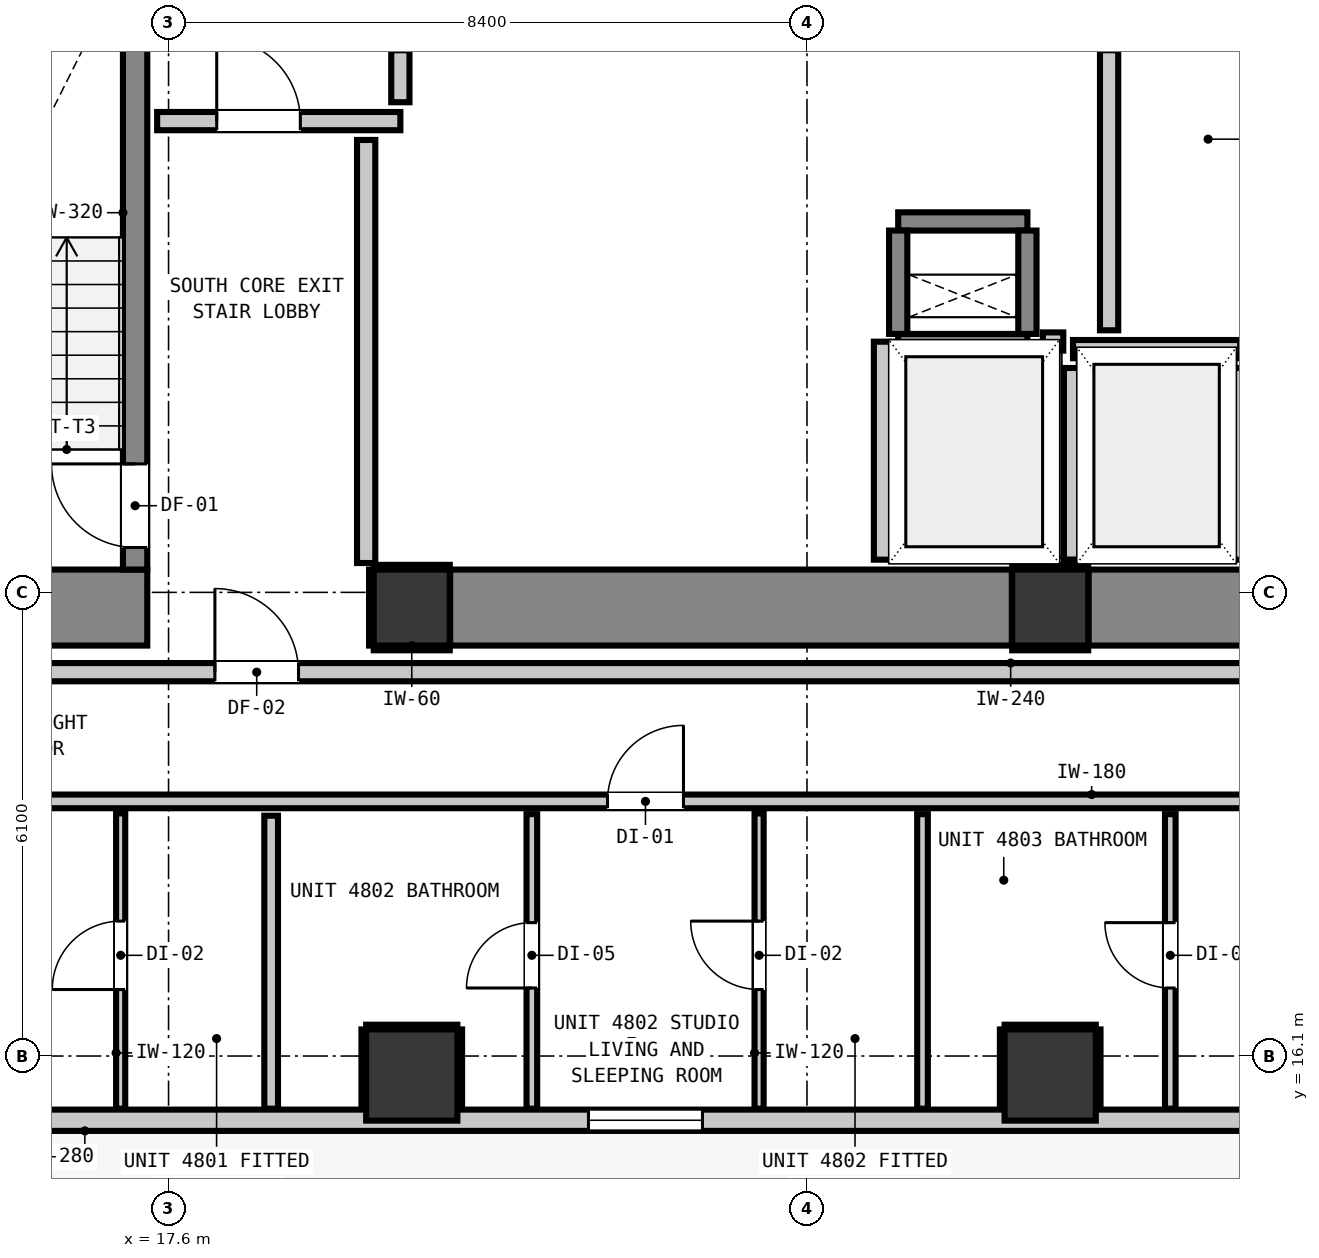
"""IFC4 building model, lengths in metres.
Left out: names, types, materials, properties, quantities, classifications, styles, units other than length and angle.
Written with IfcOpenShell. Run it as: python <this file> out.ifc"""

import sys

from ifc_helpers import new_model, si_unit, direction, frame, frame_2d, origin, origin_2d, place, context, subcontext, project, spatial, rectangle, extrude, element, fill, save


model = new_model("IFC4")
c1 = context("Model", 3, precision=1e-05, world=origin(), true_north=direction((0.0, 1.0)))
c2 = subcontext(c1, "Body", "Model", "MODEL_VIEW")
j1 = project(units=[si_unit("LENGTHUNIT", "METRE"), si_unit("PLANEANGLEUNIT", "RADIAN")], contexts=[c1])
p1 = place(None, origin())
s1 = spatial("IfcSite", under=j1, at=p1, CompositionType="ELEMENT")
p2 = place(p1, origin())
s2 = spatial("IfcBuilding", under=s1, at=p2, CompositionType="ELEMENT")
p3 = place(p2, frame((0.0, 0.0, 165.84)))
s3 = spatial("IfcBuildingStorey", under=s2, at=p3, CompositionType="ELEMENT", Elevation=165.84)
for number, where, z_axis, x_axis in (
    (1, (20.8, 22.0, 0.0), (0.0, 0.0, 1.0), (1.0, 0.0, 0.0)),
    (2, (29.2, 22.0, 0.0), (0.0, 0.0, 1.0), (1.0, 0.0, 0.0)),
):
    element("IfcColumn", number, at=place(p3, frame(where, z_axis=z_axis, x_axis=x_axis)), inside=s3, PredefinedType="COLUMN", context=c2, shape_type="SweptSolid", body=[
        extrude(rectangle(XDim=1.0, YDim=1.0, at=origin_2d()), origin(), (0.0, 0.0, 1.0), 3.32),
    ])
p4 = place(p3, frame((13.24, 22.0, 0.0), z_axis=(0.0, 0.0, 1.0), x_axis=(1.0, 0.0, 0.0)))
e3 = element("IfcWall", 3, at=p4, inside=s3, PredefinedType="SHEAR", context=c2, shape_type="SweptSolid", body=[
    extrude(rectangle(XDim=4.08, YDim=1.0, at=frame_2d((2.04, 0.0))), origin(), (0.0, 0.0, 1.0), 3.32),
])
p5 = place(p3, frame((29.705, 22.0, 0.0), z_axis=(0.0, 0.0, 1.0), x_axis=(1.0, 0.0, 0.0)))
e4 = element("IfcWall", 4, at=p5, inside=s3, PredefinedType="SHEAR", context=c2, shape_type="SweptSolid", body=[
    extrude(rectangle(XDim=6.955, YDim=1.0, at=frame_2d((3.478, 0.0))), origin(), (0.0, 0.0, 1.0), 3.32),
])
p6 = place(p3, frame((21.305, 22.0, 0.0), z_axis=(0.0, 0.0, 1.0), x_axis=(1.0, 0.0, 0.0)))
e5 = element("IfcWall", 5, at=p6, inside=s3, PredefinedType="SHEAR", context=c2, shape_type="SweptSolid", body=[
    extrude(rectangle(XDim=7.39, YDim=1.0, at=frame_2d((3.695, 0.0))), origin(), (0.0, 0.0, 1.0), 3.32),
])
p7 = place(p3, frame((17.16, 22.5, 0.0), z_axis=(0.0, 0.0, 1.0), x_axis=(0.0, 1.0, 0.0)))
e6 = element("IfcWall", 6, at=p7, inside=s3, PredefinedType="SHEAR", context=c2, shape_type="SweptSolid", body=[
    extrude(rectangle(XDim=7.9, YDim=0.32, at=frame_2d((3.95, 0.0))), origin(), (0.0, 0.0, 1.0), 3.32),
])
p8 = place(p7, frame((0.29, 0.0, 0.0)))
e7 = element("IfcOpeningElement", 7, at=p8, cuts=e6, PredefinedType="OPENING", context=c2, shape_type="SweptSolid", body=[
    extrude(rectangle(XDim=1.1, YDim=2.15, at=frame_2d((0.55, 1.075))), frame((0.0, 0.17, 0.0), z_axis=(0.0, -1.0, 0.0), x_axis=(1.0, 0.0, 0.0)), (0.0, 0.0, 1.0), 0.34),
])
for number, where, z_axis, x_axis in (
    (8, (27.2, 25.48, 0.0), (0.0, 0.0, 1.0), (1.0, 0.0, 0.0)),
    (9, (27.2, 27.08, 0.0), (0.0, 0.0, 1.0), (1.0, 0.0, 0.0)),
):
    element("IfcWall", number, at=place(p3, frame(where, z_axis=z_axis, x_axis=x_axis)), inside=s3, PredefinedType="SHEAR", context=c2, shape_type="SweptSolid", body=[
        extrude(rectangle(XDim=1.7, YDim=0.24, at=frame_2d((0.85, 0.0))), origin(), (0.0, 0.0, 1.0), 3.32),
    ])
for number, where, z_axis, x_axis in (
    (10, (27.2, 25.6, 0.0), (0.0, 0.0, 1.0), (0.0, 1.0, 0.0)),
    (11, (28.9, 25.6, 0.0), (0.0, 0.0, 1.0), (0.0, 1.0, 0.0)),
):
    element("IfcWall", number, at=place(p3, frame(where, z_axis=z_axis, x_axis=x_axis)), inside=s3, PredefinedType="SHEAR", context=c2, shape_type="SweptSolid", body=[
        extrude(rectangle(XDim=1.36, YDim=0.24, at=frame_2d((0.68, 0.0))), origin(), (0.0, 0.0, 1.0), 3.32),
    ])
for number, where, z_axis, x_axis in (
    (12, (20.8, 15.85, -0.2), (0.0, 0.0, 1.0), (1.0, 0.0, 0.0)),
    (13, (29.2, 15.85, -0.2), (0.0, 0.0, 1.0), (1.0, 0.0, 0.0)),
):
    element("IfcColumn", number, at=place(p3, frame(where, z_axis=z_axis, x_axis=x_axis)), inside=s3, PredefinedType="COLUMN", context=c2, shape_type="SweptSolid", body=[
        extrude(rectangle(XDim=1.2, YDim=1.2, at=origin_2d()), origin(), (0.0, 0.0, 1.0), 3.52),
    ])
p9 = place(p3, frame((40.445, 15.255, 0.0), z_axis=(0.0, 0.0, 1.0), x_axis=(-1.0, 0.0, 0.0)))
e14 = element("IfcWall", 14, at=p9, inside=s3, PredefinedType="STANDARD", context=c2, shape_type="SweptSolid", body=[
    extrude(rectangle(XDim=35.09, YDim=0.28, at=frame_2d((17.545, 0.0))), origin(), (0.0, 0.0, 1.0), 3.08),
])
p10 = place(p9, frame((0.904, 0.0, 0.0)))
e15 = element("IfcOpeningElement", 15, at=p10, cuts=e14, PredefinedType="OPENING", context=c2, shape_type="SweptSolid", body=[
    extrude(rectangle(XDim=1.0, YDim=2.15, at=frame_2d((0.5, 1.075))), frame((0.0, 0.15, 0.0), z_axis=(0.0, -1.0, 0.0), x_axis=(1.0, 0.0, 0.0)), (0.0, 0.0, 1.0), 0.3),
])
p11 = place(p9, frame((30.573, 0.0, 0.85)))
e16 = element("IfcOpeningElement", 16, at=p11, cuts=e14, PredefinedType="OPENING", context=c2, shape_type="SweptSolid", body=[
    extrude(rectangle(XDim=1.5, YDim=1.8, at=frame_2d((0.75, 0.9))), frame((0.0, 0.15, 0.0), z_axis=(0.0, -1.0, 0.0), x_axis=(1.0, 0.0, 0.0)), (0.0, 0.0, 1.0), 0.3),
])
p12 = place(p9, frame((15.82, 0.0, 0.85)))
e17 = element("IfcOpeningElement", 17, at=p12, cuts=e14, PredefinedType="OPENING", context=c2, shape_type="SweptSolid", body=[
    extrude(rectangle(XDim=1.5, YDim=1.8, at=frame_2d((0.75, 0.9))), frame((0.0, 0.15, 0.0), z_axis=(0.0, -1.0, 0.0), x_axis=(1.0, 0.0, 0.0)), (0.0, 0.0, 1.0), 0.3),
])
p13 = place(p9, frame((6.305, 0.0, 0.85)))
e18 = element("IfcOpeningElement", 18, at=p13, cuts=e14, PredefinedType="OPENING", context=c2, shape_type="SweptSolid", body=[
    extrude(rectangle(XDim=1.5, YDim=1.8, at=frame_2d((0.75, 0.9))), frame((0.0, 0.15, 0.0), z_axis=(0.0, -1.0, 0.0), x_axis=(1.0, 0.0, 0.0)), (0.0, 0.0, 1.0), 0.3),
])
p14 = place(p3, frame((29.5, 25.4, 0.0), z_axis=(0.0, 0.0, 1.0), x_axis=(1.0, 0.0, 0.0)))
e19 = element("IfcWall", 19, at=p14, inside=s3, PredefinedType="PARTITIONING", context=c2, shape_type="SweptSolid", body=[
    extrude(rectangle(XDim=2.2, YDim=0.24, at=frame_2d((1.1, 0.0))), origin(), (0.0, 0.0, 1.0), 3.08),
])
p15 = place(p3, frame((29.5, 22.632, 0.0), z_axis=(0.0, 0.0, 1.0), x_axis=(0.0, 1.0, 0.0)))
e20 = element("IfcWall", 20, at=p15, inside=s3, PredefinedType="PARTITIONING", context=c2, shape_type="SweptSolid", body=[
    extrude(rectangle(XDim=2.52, YDim=0.24, at=frame_2d((1.26, 0.0))), origin(), (0.0, 0.0, 1.0), 2.315),
])
p16 = place(p3, frame((31.7, 22.63, 0.0), z_axis=(0.0, 0.0, 1.0), x_axis=(0.0, 1.0, 0.0)))
e21 = element("IfcWall", 21, at=p16, inside=s3, PredefinedType="PARTITIONING", context=c2, shape_type="SweptSolid", body=[
    extrude(rectangle(XDim=2.522, YDim=0.24, at=frame_2d((1.261, 0.0))), origin(), (0.0, 0.0, 1.0), 3.08),
])
p17 = place(p3, frame((29.103, 25.5, 0.0), z_axis=(0.0, 0.0, 1.0), x_axis=(1.0, 0.0, 0.0)))
e22 = element("IfcWall", 22, at=p17, inside=s3, PredefinedType="PARTITIONING", context=c2, shape_type="SweptSolid", body=[
    extrude(rectangle(XDim=0.269, YDim=0.24, at=frame_2d((0.135, 0.0))), origin(), (0.0, 0.0, 1.0), 3.08),
])
p18 = place(p3, frame((27.0, 22.63, 0.0), z_axis=(0.0, 0.0, 1.0), x_axis=(0.0, 1.0, 0.0)))
e23 = element("IfcWall", 23, at=p18, inside=s3, PredefinedType="PARTITIONING", context=c2, shape_type="SweptSolid", body=[
    extrude(rectangle(XDim=2.868, YDim=0.24, at=frame_2d((1.434, 0.0))), origin(), (0.0, 0.0, 1.0), 3.08),
])
p19 = place(p3, frame((12.983, 21.15, 0.0), z_axis=(0.0, 0.0, 1.0), x_axis=(1.0, 0.0, 0.0)))
e24 = element("IfcWall", 24, at=p19, inside=s3, PredefinedType="PARTITIONING", context=c2, shape_type="SweptSolid", body=[
    extrude(rectangle(XDim=29.61, YDim=0.24, at=frame_2d((14.805, 0.0))), origin(), (0.0, 0.0, 1.0), 3.08),
])
p20 = place(p19, frame((5.227, 0.0, 0.0)))
e25 = element("IfcOpeningElement", 25, at=p20, cuts=e24, PredefinedType="OPENING", context=c2, shape_type="SweptSolid", body=[
    extrude(rectangle(XDim=1.1, YDim=2.15, at=frame_2d((0.55, 1.075))), frame((0.0, 0.13, 0.0), z_axis=(0.0, -1.0, 0.0), x_axis=(1.0, 0.0, 0.0)), (0.0, 0.0, 1.0), 0.26),
])
p21 = place(p19, frame((25.067, 0.0, 0.0)))
e26 = element("IfcOpeningElement", 26, at=p21, cuts=e24, PredefinedType="OPENING", context=c2, shape_type="SweptSolid", body=[
    extrude(rectangle(XDim=1.4, YDim=2.15, at=frame_2d((0.7, 1.075))), frame((0.0, 0.13, 0.0), z_axis=(0.0, -1.0, 0.0), x_axis=(1.0, 0.0, 0.0)), (0.0, 0.0, 1.0), 0.26),
])
p22 = place(p3, frame((17.45, 28.4, 0.0), z_axis=(0.0, 0.0, 1.0), x_axis=(1.0, 0.0, 0.0)))
e27 = element("IfcWall", 27, at=p22, inside=s3, PredefinedType="PARTITIONING", context=c2, shape_type="SweptSolid", body=[
    extrude(rectangle(XDim=3.2, YDim=0.24, at=frame_2d((1.6, 0.0))), origin(), (0.0, 0.0, 1.0), 3.08),
])
p23 = place(p22, frame((0.784, 0.0, 0.0)))
e28 = element("IfcOpeningElement", 28, at=p23, cuts=e27, PredefinedType="OPENING", context=c2, shape_type="SweptSolid", body=[
    extrude(rectangle(XDim=1.1, YDim=2.15, at=frame_2d((0.55, 1.075))), frame((0.0, 0.13, 0.0), z_axis=(0.0, -1.0, 0.0), x_axis=(1.0, 0.0, 0.0)), (0.0, 0.0, 1.0), 0.26),
])
p24 = place(p3, frame((12.983, 19.45, 0.0), z_axis=(0.0, 0.0, 1.0), x_axis=(1.0, 0.0, 0.0)))
e29 = element("IfcWall", 29, at=p24, inside=s3, PredefinedType="PARTITIONING", context=c2, shape_type="SweptSolid", body=[
    extrude(rectangle(XDim=29.61, YDim=0.18, at=frame_2d((14.805, 0.0))), origin(), (0.0, 0.0, 1.0), 3.08),
])
p25 = place(p24, frame((10.392, 0.0, 0.0)))
e30 = element("IfcOpeningElement", 30, at=p25, cuts=e29, PredefinedType="OPENING", context=c2, shape_type="SweptSolid", body=[
    extrude(rectangle(XDim=1.0, YDim=2.15, at=frame_2d((0.5, 1.075))), frame((0.0, 0.1, 0.0), z_axis=(0.0, -1.0, 0.0), x_axis=(1.0, 0.0, 0.0)), (0.0, 0.0, 1.0), 0.2),
])
p26 = place(p24, frame((22.132, 0.0, 0.0)))
e31 = element("IfcOpeningElement", 31, at=p26, cuts=e29, PredefinedType="OPENING", context=c2, shape_type="SweptSolid", body=[
    extrude(rectangle(XDim=1.0, YDim=2.15, at=frame_2d((0.5, 1.075))), frame((0.0, 0.1, 0.0), z_axis=(0.0, -1.0, 0.0), x_axis=(1.0, 0.0, 0.0)), (0.0, 0.0, 1.0), 0.2),
])
p27 = place(p3, frame((20.2, 22.586, 0.0), z_axis=(0.0, 0.0, 1.0), x_axis=(0.0, 1.0, 0.0)))
e32 = element("IfcWall", 32, at=p27, inside=s3, PredefinedType="PARTITIONING", context=c2, shape_type="SweptSolid", body=[
    extrude(rectangle(XDim=5.566, YDim=0.24, at=frame_2d((2.783, 0.0))), origin(), (0.0, 0.0, 1.0), 3.08),
])
p28 = place(p3, frame((20.65, 28.648, 0.0), z_axis=(0.0, 0.0, 1.0), x_axis=(0.0, 1.0, 0.0)))
e33 = element("IfcWall", 33, at=p28, inside=s3, PredefinedType="PARTITIONING", context=c2, shape_type="SweptSolid", body=[
    extrude(rectangle(XDim=0.684, YDim=0.24, at=frame_2d((0.342, 0.0))), origin(), (0.0, 0.0, 1.0), 2.315),
])
p29 = place(p3, frame((29.975, 25.648, 0.0), z_axis=(0.0, 0.0, 1.0), x_axis=(0.0, 1.0, 0.0)))
e34 = element("IfcWall", 34, at=p29, inside=s3, PredefinedType="PARTITIONING", context=c2, shape_type="SweptSolid", body=[
    extrude(rectangle(XDim=3.684, YDim=0.24, at=frame_2d((1.842, 0.0))), origin(), (0.0, 0.0, 1.0), 3.08),
])
p30 = place(p3, frame((18.95, 15.407, 0.0), z_axis=(0.0, 0.0, 1.0), x_axis=(0.0, 1.0, 0.0)))
e35 = element("IfcWall", 35, at=p30, inside=s3, PredefinedType="PARTITIONING", context=c2, shape_type="SweptSolid", body=[
    extrude(rectangle(XDim=3.855, YDim=0.18, at=frame_2d((1.927, 0.0))), origin(), (0.0, 0.0, 1.0), 3.08),
])
p31 = place(p3, frame((22.38, 15.407, 0.0), z_axis=(0.0, 0.0, 1.0), x_axis=(0.0, 1.0, 0.0)))
e36 = element("IfcWall", 36, at=p31, inside=s3, PredefinedType="PARTITIONING", context=c2, shape_type="SweptSolid", body=[
    extrude(rectangle(XDim=3.875, YDim=0.14, at=frame_2d((1.938, 0.0))), origin(), (0.0, 0.0, 1.0), 3.08),
])
p32 = place(p31, frame((1.588, 0.0, 0.0)))
e37 = element("IfcOpeningElement", 37, at=p32, cuts=e36, PredefinedType="OPENING", context=c2, shape_type="SweptSolid", body=[
    extrude(rectangle(XDim=0.86, YDim=2.02, at=frame_2d((0.43, 1.01))), frame((0.0, 0.08, 0.0), z_axis=(0.0, -1.0, 0.0), x_axis=(1.0, 0.0, 0.0)), (0.0, 0.0, 1.0), 0.16),
])
p33 = place(p3, frame((27.52, 15.407, 0.0), z_axis=(0.0, 0.0, 1.0), x_axis=(0.0, 1.0, 0.0)))
e38 = element("IfcWall", 38, at=p33, inside=s3, PredefinedType="PARTITIONING", context=c2, shape_type="SweptSolid", body=[
    extrude(rectangle(XDim=3.875, YDim=0.14, at=frame_2d((1.938, 0.0))), origin(), (0.0, 0.0, 1.0), 3.08),
])
p34 = place(p3, frame((30.78, 15.407, 0.0), z_axis=(0.0, 0.0, 1.0), x_axis=(0.0, 1.0, 0.0)))
e39 = element("IfcWall", 39, at=p34, inside=s3, PredefinedType="PARTITIONING", context=c2, shape_type="SweptSolid", body=[
    extrude(rectangle(XDim=3.875, YDim=0.14, at=frame_2d((1.938, 0.0))), origin(), (0.0, 0.0, 1.0), 3.08),
])
p35 = place(p34, frame((1.588, 0.0, 0.0)))
e40 = element("IfcOpeningElement", 40, at=p35, cuts=e39, PredefinedType="OPENING", context=c2, shape_type="SweptSolid", body=[
    extrude(rectangle(XDim=0.86, YDim=2.02, at=frame_2d((0.43, 1.01))), frame((0.0, 0.08, 0.0), z_axis=(0.0, -1.0, 0.0), x_axis=(1.0, 0.0, 0.0)), (0.0, 0.0, 1.0), 0.16),
])
p36 = place(p3, frame((16.97, 15.407, 0.0), z_axis=(0.0, 0.0, 1.0), x_axis=(0.0, 1.0, 0.0)))
e41 = element("IfcWall", 41, at=p36, inside=s3, PredefinedType="PARTITIONING", context=c2, shape_type="SweptSolid", body=[
    extrude(rectangle(XDim=3.885, YDim=0.12, at=frame_2d((1.942, 0.0))), origin(), (0.0, 0.0, 1.0), 3.08),
])
p37 = place(p36, frame((1.568, 0.0, 0.0)))
e42 = element("IfcOpeningElement", 42, at=p37, cuts=e41, PredefinedType="OPENING", context=c2, shape_type="SweptSolid", body=[
    extrude(rectangle(XDim=0.9, YDim=2.1, at=frame_2d((0.45, 1.05))), frame((0.0, 0.07, 0.0), z_axis=(0.0, -1.0, 0.0), x_axis=(1.0, 0.0, 0.0)), (0.0, 0.0, 1.0), 0.14),
])
p38 = place(p3, frame((25.37, 15.407, 0.0), z_axis=(0.0, 0.0, 1.0), x_axis=(0.0, 1.0, 0.0)))
e43 = element("IfcWall", 43, at=p38, inside=s3, PredefinedType="PARTITIONING", context=c2, shape_type="SweptSolid", body=[
    extrude(rectangle(XDim=3.885, YDim=0.12, at=frame_2d((1.942, 0.0))), origin(), (0.0, 0.0, 1.0), 3.08),
])
p39 = place(p38, frame((1.568, 0.0, 0.0)))
e44 = element("IfcOpeningElement", 44, at=p39, cuts=e43, PredefinedType="OPENING", context=c2, shape_type="SweptSolid", body=[
    extrude(rectangle(XDim=0.9, YDim=2.1, at=frame_2d((0.45, 1.05))), frame((0.0, 0.07, 0.0), z_axis=(0.0, -1.0, 0.0), x_axis=(1.0, 0.0, 0.0)), (0.0, 0.0, 1.0), 0.14),
])
for number, where, z_axis, x_axis in (
    (45, (20.3, 21.468, 0.0), (0.0, 0.0, 1.0), (1.0, 0.0, 0.0)),
    (46, (20.3, 22.532, 0.0), (0.0, 0.0, 1.0), (1.0, 0.0, 0.0)),
    (47, (20.268, 21.5, 0.0), (0.0, 0.0, 1.0), (0.0, 1.0, 0.0)),
    (48, (28.7, 21.468, 0.0), (0.0, 0.0, 1.0), (1.0, 0.0, 0.0)),
    (49, (28.7, 22.532, 0.0), (0.0, 0.0, 1.0), (1.0, 0.0, 0.0)),
):
    element("IfcWall", number, at=place(p3, frame(where, z_axis=z_axis, x_axis=x_axis)), inside=s3, PredefinedType="PARTITIONING", context=c2, shape_type="SweptSolid", body=[
        extrude(rectangle(XDim=1.0, YDim=0.06, at=frame_2d((0.5, 0.0))), origin(), (0.0, 0.0, 1.0), 1.45),
    ])
p40 = place(p3, frame((20.2, 16.482, 0.0), z_axis=(0.0, 0.0, 1.0), x_axis=(1.0, 0.0, 0.0)))
e50 = element("IfcWall", 50, at=p40, inside=s3, PredefinedType="PARTITIONING", context=c2, shape_type="SweptSolid", body=[
    extrude(rectangle(XDim=1.2, YDim=0.06, at=frame_2d((0.6, 0.0))), origin(), (0.0, 0.0, 1.0), 1.45),
])
for number, where, z_axis, x_axis in (
    (51, (20.168, 15.41, 0.0), (0.0, 0.0, 1.0), (0.0, 1.0, 0.0)),
    (52, (21.432, 15.41, 0.0), (0.0, 0.0, 1.0), (0.0, 1.0, 0.0)),
):
    element("IfcWall", number, at=place(p3, frame(where, z_axis=z_axis, x_axis=x_axis)), inside=s3, PredefinedType="PARTITIONING", context=c2, shape_type="SweptSolid", body=[
        extrude(rectangle(XDim=1.04, YDim=0.06, at=frame_2d((0.52, 0.0))), origin(), (0.0, 0.0, 1.0), 1.45),
    ])
p41 = place(p3, frame((28.6, 16.482, 0.0), z_axis=(0.0, 0.0, 1.0), x_axis=(1.0, 0.0, 0.0)))
e53 = element("IfcWall", 53, at=p41, inside=s3, PredefinedType="PARTITIONING", context=c2, shape_type="SweptSolid", body=[
    extrude(rectangle(XDim=1.2, YDim=0.06, at=frame_2d((0.6, 0.0))), origin(), (0.0, 0.0, 1.0), 1.45),
])
for number, where, z_axis, x_axis in (
    (54, (28.568, 15.41, 0.0), (0.0, 0.0, 1.0), (0.0, 1.0, 0.0)),
    (55, (29.832, 15.41, 0.0), (0.0, 0.0, 1.0), (0.0, 1.0, 0.0)),
):
    element("IfcWall", number, at=place(p3, frame(where, z_axis=z_axis, x_axis=x_axis)), inside=s3, PredefinedType="PARTITIONING", context=c2, shape_type="SweptSolid", body=[
        extrude(rectangle(XDim=1.04, YDim=0.06, at=frame_2d((0.52, 0.0))), origin(), (0.0, 0.0, 1.0), 1.45),
    ])
p42 = place(p12, origin())
e56 = element("IfcWindow", 56, at=p42, inside=s3, PartitioningType="SINGLE_PANEL", PredefinedType="WINDOW", context=c2, shape_type="SweptSolid", body=[
    extrude(rectangle(XDim=1.5, YDim=1.8, at=frame_2d((0.75, 0.9))), frame((0.0, 0.03, 0.0), z_axis=(0.0, -1.0, 0.0), x_axis=(1.0, 0.0, 0.0)), (0.0, 0.0, 1.0), 0.06),
])
fill(e17, e56)
p43 = place(p8, origin())
e57 = element("IfcDoor", 57, at=p43, inside=s3, OperationType="SINGLE_SWING_RIGHT", PredefinedType="DOOR", context=c2, shape_type="SweptSolid", body=[
    extrude(rectangle(XDim=1.1, YDim=2.15, at=frame_2d((0.55, 1.075))), frame((0.0, 0.025, 0.0), z_axis=(0.0, -1.0, 0.0), x_axis=(1.0, 0.0, 0.0)), (0.0, 0.0, 1.0), 0.05),
])
fill(e7, e57)
p44 = place(p23, origin())
e58 = element("IfcDoor", 58, at=p44, inside=s3, OperationType="SINGLE_SWING_LEFT", PredefinedType="DOOR", context=c2, shape_type="SweptSolid", body=[
    extrude(rectangle(XDim=1.1, YDim=2.15, at=frame_2d((0.55, 1.075))), frame((0.0, 0.025, 0.0), z_axis=(0.0, -1.0, 0.0), x_axis=(1.0, 0.0, 0.0)), (0.0, 0.0, 1.0), 0.05),
])
fill(e28, e58)
p45 = place(p20, origin())
e59 = element("IfcDoor", 59, at=p45, inside=s3, OperationType="SINGLE_SWING_LEFT", PredefinedType="DOOR", context=c2, shape_type="SweptSolid", body=[
    extrude(rectangle(XDim=1.1, YDim=2.15, at=frame_2d((0.55, 1.075))), frame((0.0, 0.025, 0.0), z_axis=(0.0, -1.0, 0.0), x_axis=(1.0, 0.0, 0.0)), (0.0, 0.0, 1.0), 0.05),
])
fill(e25, e59)
p46 = place(p37, origin())
e60 = element("IfcDoor", 60, at=p46, inside=s3, OperationType="SINGLE_SWING_LEFT", PredefinedType="DOOR", context=c2, shape_type="SweptSolid", body=[
    extrude(rectangle(XDim=0.9, YDim=2.1, at=frame_2d((0.45, 1.05))), frame((0.0, 0.025, 0.0), z_axis=(0.0, -1.0, 0.0), x_axis=(1.0, 0.0, 0.0)), (0.0, 0.0, 1.0), 0.05),
])
fill(e42, e60)
p47 = place(p25, origin())
e61 = element("IfcDoor", 61, at=p47, inside=s3, OperationType="SINGLE_SWING_RIGHT", PredefinedType="DOOR", context=c2, shape_type="SweptSolid", body=[
    extrude(rectangle(XDim=1.0, YDim=2.15, at=frame_2d((0.5, 1.075))), frame((0.0, 0.025, 0.0), z_axis=(0.0, -1.0, 0.0), x_axis=(1.0, 0.0, 0.0)), (0.0, 0.0, 1.0), 0.05),
])
fill(e30, e61)
p48 = place(p32, origin())
e62 = element("IfcDoor", 62, at=p48, inside=s3, OperationType="SINGLE_SWING_LEFT", PredefinedType="DOOR", context=c2, shape_type="SweptSolid", body=[
    extrude(rectangle(XDim=0.86, YDim=2.02, at=frame_2d((0.43, 1.01))), frame((0.0, 0.025, 0.0), z_axis=(0.0, -1.0, 0.0), x_axis=(1.0, 0.0, 0.0)), (0.0, 0.0, 1.0), 0.05),
])
fill(e37, e62)
p49 = place(p39, origin())
e63 = element("IfcDoor", 63, at=p49, inside=s3, OperationType="SINGLE_SWING_RIGHT", PredefinedType="DOOR", context=c2, shape_type="SweptSolid", body=[
    extrude(rectangle(XDim=0.9, YDim=2.1, at=frame_2d((0.45, 1.05))), frame((0.0, 0.025, 0.0), z_axis=(0.0, -1.0, 0.0), x_axis=(1.0, 0.0, 0.0)), (0.0, 0.0, 1.0), 0.05),
])
fill(e44, e63)
p50 = place(p35, origin())
e64 = element("IfcDoor", 64, at=p50, inside=s3, OperationType="SINGLE_SWING_RIGHT", PredefinedType="DOOR", context=c2, shape_type="SweptSolid", body=[
    extrude(rectangle(XDim=0.86, YDim=2.02, at=frame_2d((0.43, 1.01))), frame((0.0, 0.025, 0.0), z_axis=(0.0, -1.0, 0.0), x_axis=(1.0, 0.0, 0.0)), (0.0, 0.0, 1.0), 0.05),
])
fill(e40, e64)
save(model, sys.argv[1])
